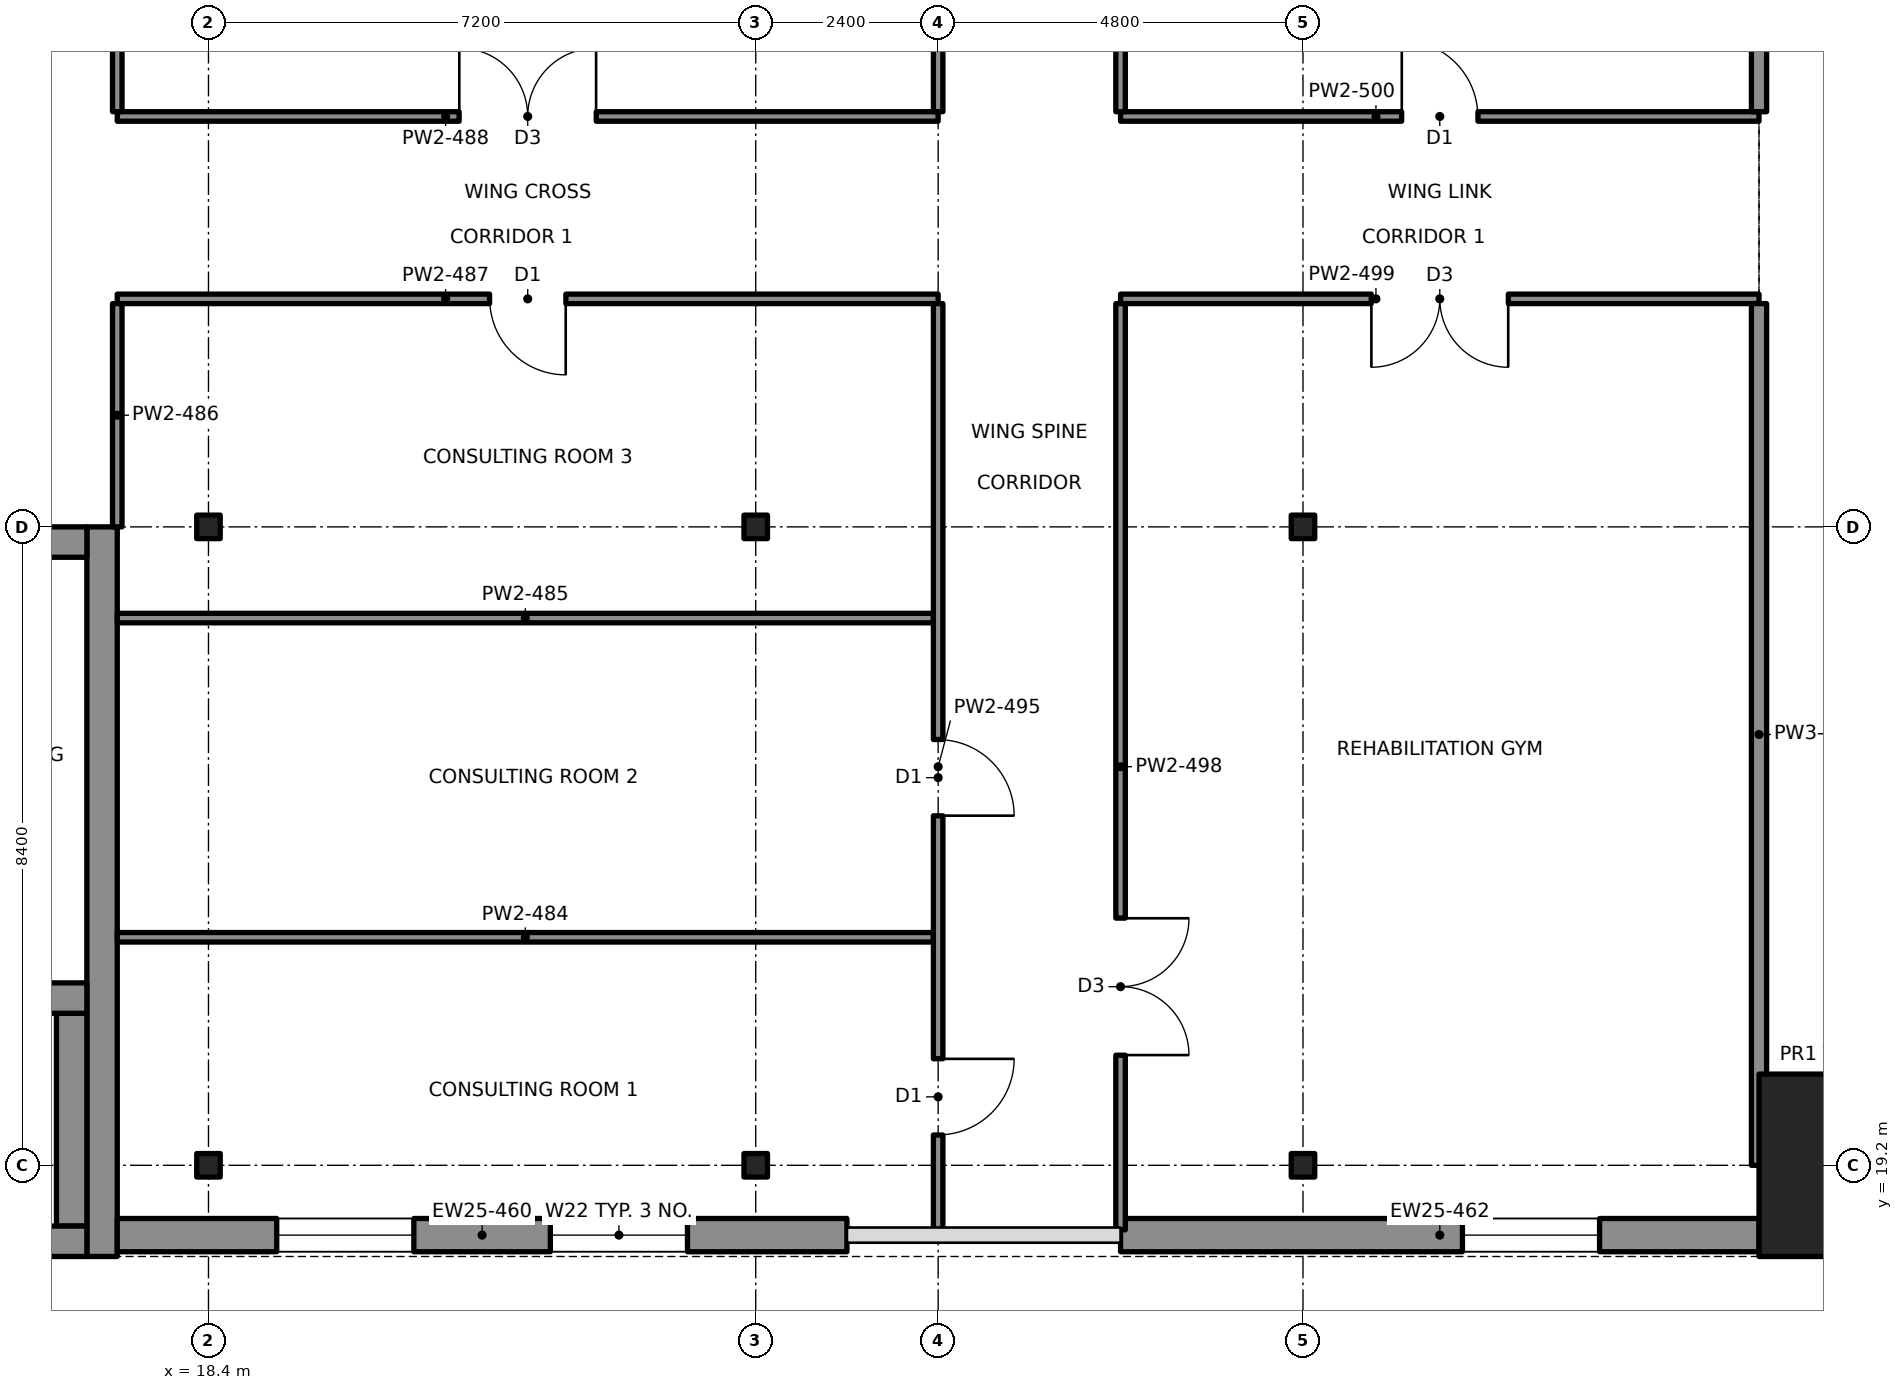
"""IFC4 building model, lengths in metres.
Left out: names, types, materials, properties, quantities, classifications, styles, units other than length and angle.
Written with IfcOpenShell. Run it as: python <this file> out.ifc"""

import sys

from ifc_helpers import new_model, si_unit, direction, frame, frame_2d, origin, origin_2d, place, context, subcontext, project, spatial, rectangle, i_section, extrude, element, fill, save


model = new_model("IFC4")
c1 = context("Model", 3, precision=1e-05, world=origin(), true_north=direction((0.0, 1.0)))
c2 = subcontext(c1, "Body", "Model", "MODEL_VIEW")
j1 = project(units=[si_unit("LENGTHUNIT", "METRE"), si_unit("PLANEANGLEUNIT", "RADIAN")], contexts=[c1])
p1 = place(None, origin())
s1 = spatial("IfcSite", under=j1, at=p1, CompositionType="ELEMENT")
p2 = place(p1, origin())
s2 = spatial("IfcBuilding", under=s1, at=p2, CompositionType="ELEMENT")
p3 = place(p2, frame((0.0, 0.0, 4.4)))
s3 = spatial("IfcBuildingStorey", under=s2, at=p3, CompositionType="ELEMENT", Elevation=4.4)
p4 = place(p3, frame((40.0, 19.2, 0.0), z_axis=(0.0, 0.0, 1.0), x_axis=(1.0, 0.0, 0.0)))
e1 = element("IfcColumn", 1, at=p4, inside=s3, PredefinedType="COLUMN", context=c2, shape_type="SweptSolid", body=[
    extrude(rectangle(XDim=2.4, YDim=2.4, at=origin_2d()), origin(), (0.0, 0.0, 1.0), 4.4),
])
for number, where, z_axis, x_axis in (
    (2, (18.4, 19.2, 0.0), (0.0, 0.0, 1.0), (1.0, 0.0, 0.0)),
    (3, (18.4, 27.6, 0.0), (0.0, 0.0, 1.0), (1.0, 0.0, 0.0)),
    (4, (25.6, 19.2, 0.0), (0.0, 0.0, 1.0), (1.0, 0.0, 0.0)),
    (5, (25.6, 27.6, 0.0), (0.0, 0.0, 1.0), (1.0, 0.0, 0.0)),
    (6, (32.8, 19.2, 0.0), (0.0, 0.0, 1.0), (1.0, 0.0, 0.0)),
    (7, (32.8, 27.6, 0.0), (0.0, 0.0, 1.0), (1.0, 0.0, 0.0)),
):
    element("IfcColumn", number, at=place(p3, frame(where, z_axis=z_axis, x_axis=x_axis)), inside=s3, PredefinedType="COLUMN", context=c2, shape_type="SweptSolid", body=[
        extrude(i_section(OverallWidth=0.309, OverallDepth=0.323, WebThickness=0.014, FlangeThickness=0.023, at=origin_2d()), origin(), (0.0, 0.0, 1.0), 4.4),
    ])
p5 = place(p3, frame((17.2, 18.281, 0.0), z_axis=(0.0, 0.0, 1.0), x_axis=(1.0, 0.0, 0.0)))
e8 = element("IfcWall", 8, at=p5, inside=s3, PredefinedType="SOLIDWALL", context=c2, shape_type="SweptSolid", body=[
    extrude(rectangle(XDim=9.6, YDim=0.438, at=frame_2d((4.8, 0.0))), origin(), (0.0, 0.0, 1.0), 4.4),
])
p6 = place(p5, frame((2.1, 0.0, 0.75)))
e9 = element("IfcOpeningElement", 9, at=p6, cuts=e8, PredefinedType="OPENING", context=c2, shape_type="SweptSolid", body=[
    extrude(rectangle(XDim=1.8, YDim=2.8, at=frame_2d((0.9, 1.4))), frame((0.0, 0.229, 0.0), z_axis=(0.0, -1.0, 0.0), x_axis=(1.0, 0.0, 0.0)), (0.0, 0.0, 1.0), 0.458),
])
p7 = place(p5, frame((5.7, 0.0, 0.75)))
e10 = element("IfcOpeningElement", 10, at=p7, cuts=e8, PredefinedType="OPENING", context=c2, shape_type="SweptSolid", body=[
    extrude(rectangle(XDim=1.8, YDim=2.8, at=frame_2d((0.9, 1.4))), frame((0.0, 0.229, 0.0), z_axis=(0.0, -1.0, 0.0), x_axis=(1.0, 0.0, 0.0)), (0.0, 0.0, 1.0), 0.458),
])
p8 = place(p3, frame((30.4, 18.281, 0.0), z_axis=(0.0, 0.0, 1.0), x_axis=(1.0, 0.0, 0.0)))
e11 = element("IfcWall", 11, at=p8, inside=s3, PredefinedType="SOLIDWALL", context=c2, shape_type="SweptSolid", body=[
    extrude(rectangle(XDim=8.4, YDim=0.438, at=frame_2d((4.2, 0.0))), origin(), (0.0, 0.0, 1.0), 4.4),
])
p9 = place(p8, frame((4.5, 0.0, 0.75)))
e12 = element("IfcOpeningElement", 12, at=p9, cuts=e11, PredefinedType="OPENING", context=c2, shape_type="SweptSolid", body=[
    extrude(rectangle(XDim=1.8, YDim=2.8, at=frame_2d((0.9, 1.4))), frame((0.0, 0.229, 0.0), z_axis=(0.0, -1.0, 0.0), x_axis=(1.0, 0.0, 0.0)), (0.0, 0.0, 1.0), 0.458),
])
p10 = place(p3, frame((17.0, 18.0, 0.0), z_axis=(0.0, 0.0, 1.0), x_axis=(0.0, 1.0, 0.0)))
e13 = element("IfcWall", 13, at=p10, inside=s3, PredefinedType="SHEAR", context=c2, shape_type="SweptSolid", body=[
    extrude(rectangle(XDim=9.6, YDim=0.4, at=frame_2d((4.8, 0.0))), origin(), (0.0, 0.0, 1.0), 4.4),
])
p11 = place(p3, frame((10.4, 18.2, 0.0), z_axis=(0.0, 0.0, 1.0), x_axis=(1.0, 0.0, 0.0)))
e14 = element("IfcWall", 14, at=p11, inside=s3, PredefinedType="SHEAR", context=c2, shape_type="SweptSolid", body=[
    extrude(rectangle(XDim=6.4, YDim=0.4, at=frame_2d((3.2, 0.0))), origin(), (0.0, 0.0, 1.0), 4.4),
])
p12 = place(p3, frame((10.4, 27.4, 0.0), z_axis=(0.0, 0.0, 1.0), x_axis=(1.0, 0.0, 0.0)))
e15 = element("IfcWall", 15, at=p12, inside=s3, PredefinedType="SHEAR", context=c2, shape_type="SweptSolid", body=[
    extrude(rectangle(XDim=6.4, YDim=0.4, at=frame_2d((3.2, 0.0))), origin(), (0.0, 0.0, 1.0), 4.4),
])
p13 = place(p12, frame((4.4, 0.0, 0.0)))
e16 = element("IfcOpeningElement", 16, at=p13, cuts=e15, PredefinedType="OPENING", context=c2, shape_type="SweptSolid", body=[
    extrude(rectangle(XDim=1.2, YDim=2.1, at=frame_2d((0.6, 1.05))), frame((0.0, 0.21, 0.0), z_axis=(0.0, -1.0, 0.0), x_axis=(1.0, 0.0, 0.0)), (0.0, 0.0, 1.0), 0.42),
])
p14 = place(p3, frame((14.0, 21.4, 0.0), z_axis=(0.0, 0.0, 1.0), x_axis=(1.0, 0.0, 0.0)))
e17 = element("IfcWall", 17, at=p14, inside=s3, PredefinedType="SHEAR", context=c2, shape_type="SweptSolid", body=[
    extrude(rectangle(XDim=2.8, YDim=0.4, at=frame_2d((1.4, 0.0))), origin(), (0.0, 0.0, 1.0), 4.4),
])
p15 = place(p14, frame((0.65, 0.0, 0.0)))
e18 = element("IfcOpeningElement", 18, at=p15, cuts=e17, PredefinedType="OPENING", context=c2, shape_type="SweptSolid", body=[
    extrude(rectangle(XDim=1.1, YDim=2.1, at=frame_2d((0.55, 1.05))), frame((0.0, 0.21, 0.0), z_axis=(0.0, -1.0, 0.0), x_axis=(1.0, 0.0, 0.0)), (0.0, 0.0, 1.0), 0.42),
])
p16 = place(p3, frame((16.6, 18.4, 0.0), z_axis=(0.0, 0.0, 1.0), x_axis=(0.0, 1.0, 0.0)))
e19 = element("IfcWall", 19, at=p16, inside=s3, PredefinedType="SHEAR", context=c2, shape_type="SweptSolid", body=[
    extrude(rectangle(XDim=2.8, YDim=0.4, at=frame_2d((1.4, 0.0))), origin(), (0.0, 0.0, 1.0), 4.4),
])
for number, where, z_axis, x_axis in (
    (20, (17.2, 22.2, 0.0), (0.0, 0.0, 1.0), (1.0, 0.0, 0.0)),
    (21, (17.2, 26.4, 0.0), (0.0, 0.0, 1.0), (1.0, 0.0, 0.0)),
):
    element("IfcWall", number, at=place(p3, frame(where, z_axis=z_axis, x_axis=x_axis)), inside=s3, PredefinedType="PARTITIONING", context=c2, shape_type="SweptSolid", body=[
        extrude(rectangle(XDim=10.738, YDim=0.125, at=frame_2d((5.369, 0.0))), origin(), (0.0, 0.0, 1.0), 3.65),
    ])
p17 = place(p3, frame((17.2, 30.6, 0.0), z_axis=(0.0, 0.0, 1.0), x_axis=(1.0, 0.0, 0.0)))
e22 = element("IfcWall", 22, at=p17, inside=s3, PredefinedType="PARTITIONING", context=c2, shape_type="SweptSolid", body=[
    extrude(rectangle(XDim=10.8, YDim=0.125, at=frame_2d((5.4, 0.0))), origin(), (0.0, 0.0, 1.0), 3.65),
])
p18 = place(p17, frame((4.9, 0.0, 0.0)))
e23 = element("IfcOpeningElement", 23, at=p18, cuts=e22, PredefinedType="OPENING", context=c2, shape_type="SweptSolid", body=[
    extrude(rectangle(XDim=1.0, YDim=2.1, at=frame_2d((0.5, 1.05))), frame((0.0, 0.073, 0.0), z_axis=(0.0, -1.0, 0.0), x_axis=(1.0, 0.0, 0.0)), (0.0, 0.0, 1.0), 0.145),
])
p19 = place(p3, frame((30.4, 30.6, 0.0), z_axis=(0.0, 0.0, 1.0), x_axis=(1.0, 0.0, 0.0)))
e24 = element("IfcWall", 24, at=p19, inside=s3, PredefinedType="PARTITIONING", context=c2, shape_type="SweptSolid", body=[
    extrude(rectangle(XDim=8.4, YDim=0.125, at=frame_2d((4.2, 0.0))), origin(), (0.0, 0.0, 1.0), 3.65),
])
p20 = place(p19, frame((3.3, 0.0, 0.0)))
e25 = element("IfcOpeningElement", 25, at=p20, cuts=e24, PredefinedType="OPENING", context=c2, shape_type="SweptSolid", body=[
    extrude(rectangle(XDim=1.8, YDim=2.1, at=frame_2d((0.9, 1.05))), frame((0.0, 0.073, 0.0), z_axis=(0.0, -1.0, 0.0), x_axis=(1.0, 0.0, 0.0)), (0.0, 0.0, 1.0), 0.145),
])
p21 = place(p3, frame((17.2, 33.0, 0.0), z_axis=(0.0, 0.0, 1.0), x_axis=(1.0, 0.0, 0.0)))
e26 = element("IfcWall", 26, at=p21, inside=s3, PredefinedType="PARTITIONING", context=c2, shape_type="SweptSolid", body=[
    extrude(rectangle(XDim=10.8, YDim=0.125, at=frame_2d((5.4, 0.0))), origin(), (0.0, 0.0, 1.0), 3.65),
])
p22 = place(p21, frame((4.5, 0.0, 0.0)))
e27 = element("IfcOpeningElement", 27, at=p22, cuts=e26, PredefinedType="OPENING", context=c2, shape_type="SweptSolid", body=[
    extrude(rectangle(XDim=1.8, YDim=2.1, at=frame_2d((0.9, 1.05))), frame((0.0, 0.073, 0.0), z_axis=(0.0, -1.0, 0.0), x_axis=(1.0, 0.0, 0.0)), (0.0, 0.0, 1.0), 0.145),
])
p23 = place(p3, frame((30.4, 33.0, 0.0), z_axis=(0.0, 0.0, 1.0), x_axis=(1.0, 0.0, 0.0)))
e28 = element("IfcWall", 28, at=p23, inside=s3, PredefinedType="PARTITIONING", context=c2, shape_type="SweptSolid", body=[
    extrude(rectangle(XDim=8.4, YDim=0.125, at=frame_2d((4.2, 0.0))), origin(), (0.0, 0.0, 1.0), 3.65),
])
p24 = place(p23, frame((3.7, 0.0, 0.0)))
e29 = element("IfcOpeningElement", 29, at=p24, cuts=e28, PredefinedType="OPENING", context=c2, shape_type="SweptSolid", body=[
    extrude(rectangle(XDim=1.0, YDim=2.1, at=frame_2d((0.5, 1.05))), frame((0.0, 0.073, 0.0), z_axis=(0.0, -1.0, 0.0), x_axis=(1.0, 0.0, 0.0)), (0.0, 0.0, 1.0), 0.145),
])
p25 = place(p3, frame((17.2, 27.6, 0.0), z_axis=(0.0, 0.0, 1.0), x_axis=(0.0, 1.0, 0.0)))
e30 = element("IfcWall", 30, at=p25, inside=s3, PredefinedType="PARTITIONING", context=c2, shape_type="SweptSolid", body=[
    extrude(rectangle(XDim=2.938, YDim=0.125, at=frame_2d((1.469, 0.0))), origin(), (0.0, 0.0, 1.0), 3.65),
])
p26 = place(p3, frame((17.2, 33.062, 0.0), z_axis=(0.0, 0.0, 1.0), x_axis=(0.0, 1.0, 0.0)))
e31 = element("IfcWall", 31, at=p26, inside=s3, PredefinedType="PARTITIONING", context=c2, shape_type="SweptSolid", body=[
    extrude(rectangle(XDim=5.875, YDim=0.125, at=frame_2d((2.938, 0.0))), origin(), (0.0, 0.0, 1.0), 3.65),
])
p27 = place(p3, frame((28.0, 18.351, 0.0), z_axis=(0.0, 0.0, 1.0), x_axis=(0.0, 1.0, 0.0)))
e32 = element("IfcWall", 32, at=p27, inside=s3, PredefinedType="PARTITIONING", context=c2, shape_type="SweptSolid", body=[
    extrude(rectangle(XDim=12.186, YDim=0.125, at=frame_2d((6.093, 0.0))), origin(), (0.0, 0.0, 1.0), 3.65),
])
p28 = place(p27, frame((1.249, 0.0, 0.0)))
e33 = element("IfcOpeningElement", 33, at=p28, cuts=e32, PredefinedType="OPENING", context=c2, shape_type="SweptSolid", body=[
    extrude(rectangle(XDim=1.0, YDim=2.1, at=frame_2d((0.5, 1.05))), frame((0.0, 0.073, 0.0), z_axis=(0.0, -1.0, 0.0), x_axis=(1.0, 0.0, 0.0)), (0.0, 0.0, 1.0), 0.145),
])
p29 = place(p27, frame((5.449, 0.0, 0.0)))
e34 = element("IfcOpeningElement", 34, at=p29, cuts=e32, PredefinedType="OPENING", context=c2, shape_type="SweptSolid", body=[
    extrude(rectangle(XDim=1.0, YDim=2.1, at=frame_2d((0.5, 1.05))), frame((0.0, 0.073, 0.0), z_axis=(0.0, -1.0, 0.0), x_axis=(1.0, 0.0, 0.0)), (0.0, 0.0, 1.0), 0.145),
])
p30 = place(p3, frame((28.0, 33.062, 0.0), z_axis=(0.0, 0.0, 1.0), x_axis=(0.0, 1.0, 0.0)))
e35 = element("IfcWall", 35, at=p30, inside=s3, PredefinedType="PARTITIONING", context=c2, shape_type="SweptSolid", body=[
    extrude(rectangle(XDim=5.875, YDim=0.125, at=frame_2d((2.938, 0.0))), origin(), (0.0, 0.0, 1.0), 3.65),
])
p31 = place(p3, frame((30.4, 18.351, 0.0), z_axis=(0.0, 0.0, 1.0), x_axis=(0.0, 1.0, 0.0)))
e36 = element("IfcWall", 36, at=p31, inside=s3, PredefinedType="PARTITIONING", context=c2, shape_type="SweptSolid", body=[
    extrude(rectangle(XDim=12.186, YDim=0.125, at=frame_2d((6.093, 0.0))), origin(), (0.0, 0.0, 1.0), 3.65),
])
p32 = place(p31, frame((2.299, 0.0, 0.0)))
e37 = element("IfcOpeningElement", 37, at=p32, cuts=e36, PredefinedType="OPENING", context=c2, shape_type="SweptSolid", body=[
    extrude(rectangle(XDim=1.8, YDim=2.1, at=frame_2d((0.9, 1.05))), frame((0.0, 0.073, 0.0), z_axis=(0.0, -1.0, 0.0), x_axis=(1.0, 0.0, 0.0)), (0.0, 0.0, 1.0), 0.145),
])
p33 = place(p3, frame((30.4, 33.062, 0.0), z_axis=(0.0, 0.0, 1.0), x_axis=(0.0, 1.0, 0.0)))
e38 = element("IfcWall", 38, at=p33, inside=s3, PredefinedType="PARTITIONING", context=c2, shape_type="SweptSolid", body=[
    extrude(rectangle(XDim=3.238, YDim=0.125, at=frame_2d((1.619, 0.0))), origin(), (0.0, 0.0, 1.0), 3.65),
])
p34 = place(p3, frame((38.8, 19.2, 0.0), z_axis=(0.0, 0.0, 1.0), x_axis=(0.0, 1.0, 0.0)))
e39 = element("IfcWall", 39, at=p34, inside=s3, PredefinedType="PARTITIONING", context=c2, shape_type="SweptSolid", body=[
    extrude(rectangle(XDim=11.338, YDim=0.2, at=frame_2d((5.669, 0.0))), origin(), (0.0, 0.0, 1.0), 3.65),
])
p35 = place(p3, frame((38.8, 33.062, 0.0), z_axis=(0.0, 0.0, 1.0), x_axis=(0.0, 1.0, 0.0)))
e40 = element("IfcWall", 40, at=p35, inside=s3, PredefinedType="PARTITIONING", context=c2, shape_type="SweptSolid", body=[
    extrude(rectangle(XDim=5.837, YDim=0.2, at=frame_2d((2.919, 0.0))), origin(), (0.0, 0.0, 1.0), 3.65),
])
p36 = place(p6, origin())
e41 = element("IfcWindow", 41, at=p36, inside=s3, PartitioningType="SINGLE_PANEL", PredefinedType="WINDOW", context=c2, shape_type="SweptSolid", body=[
    extrude(rectangle(XDim=1.8, YDim=2.8, at=frame_2d((0.9, 1.4))), frame((0.0, 0.03, 0.0), z_axis=(0.0, -1.0, 0.0), x_axis=(1.0, 0.0, 0.0)), (0.0, 0.0, 1.0), 0.06),
])
fill(e9, e41)
p37 = place(p7, origin())
e42 = element("IfcWindow", 42, at=p37, inside=s3, PartitioningType="SINGLE_PANEL", PredefinedType="WINDOW", context=c2, shape_type="SweptSolid", body=[
    extrude(rectangle(XDim=1.8, YDim=2.8, at=frame_2d((0.9, 1.4))), frame((0.0, 0.03, 0.0), z_axis=(0.0, -1.0, 0.0), x_axis=(1.0, 0.0, 0.0)), (0.0, 0.0, 1.0), 0.06),
])
fill(e10, e42)
p38 = place(p9, origin())
e43 = element("IfcWindow", 43, at=p38, inside=s3, PartitioningType="SINGLE_PANEL", PredefinedType="WINDOW", context=c2, shape_type="SweptSolid", body=[
    extrude(rectangle(XDim=1.8, YDim=2.8, at=frame_2d((0.9, 1.4))), frame((0.0, 0.03, 0.0), z_axis=(0.0, -1.0, 0.0), x_axis=(1.0, 0.0, 0.0)), (0.0, 0.0, 1.0), 0.06),
])
fill(e12, e43)
p39 = place(p28, origin())
e44 = element("IfcDoor", 44, at=p39, inside=s3, OperationType="SINGLE_SWING_RIGHT", PredefinedType="DOOR", context=c2, shape_type="SweptSolid", body=[
    extrude(rectangle(XDim=1.0, YDim=2.1, at=frame_2d((0.5, 1.05))), frame((0.0, 0.025, 0.0), z_axis=(0.0, -1.0, 0.0), x_axis=(1.0, 0.0, 0.0)), (0.0, 0.0, 1.0), 0.05),
])
fill(e33, e44)
p40 = place(p29, origin())
e45 = element("IfcDoor", 45, at=p40, inside=s3, OperationType="SINGLE_SWING_LEFT", PredefinedType="DOOR", context=c2, shape_type="SweptSolid", body=[
    extrude(rectangle(XDim=1.0, YDim=2.1, at=frame_2d((0.5, 1.05))), frame((0.0, 0.025, 0.0), z_axis=(0.0, -1.0, 0.0), x_axis=(1.0, 0.0, 0.0)), (0.0, 0.0, 1.0), 0.05),
])
fill(e34, e45)
p41 = place(p18, origin())
e46 = element("IfcDoor", 46, at=p41, inside=s3, OperationType="SINGLE_SWING_RIGHT", PredefinedType="DOOR", context=c2, shape_type="SweptSolid", body=[
    extrude(rectangle(XDim=1.0, YDim=2.1, at=frame_2d((0.5, 1.05))), frame((0.0, 0.025, 0.0), z_axis=(0.0, -1.0, 0.0), x_axis=(1.0, 0.0, 0.0)), (0.0, 0.0, 1.0), 0.05),
])
fill(e23, e46)
p42 = place(p22, origin())
e47 = element("IfcDoor", 47, at=p42, inside=s3, OperationType="DOUBLE_DOOR_SINGLE_SWING", PredefinedType="DOOR", context=c2, shape_type="SweptSolid", body=[
    extrude(rectangle(XDim=1.8, YDim=2.1, at=frame_2d((0.9, 1.05))), frame((0.0, 0.025, 0.0), z_axis=(0.0, -1.0, 0.0), x_axis=(1.0, 0.0, 0.0)), (0.0, 0.0, 1.0), 0.05),
])
fill(e27, e47)
p43 = place(p32, origin())
e48 = element("IfcDoor", 48, at=p43, inside=s3, OperationType="DOUBLE_DOOR_SINGLE_SWING", PredefinedType="DOOR", context=c2, shape_type="SweptSolid", body=[
    extrude(rectangle(XDim=1.8, YDim=2.1, at=frame_2d((0.9, 1.05))), frame((0.0, 0.025, 0.0), z_axis=(0.0, -1.0, 0.0), x_axis=(1.0, 0.0, 0.0)), (0.0, 0.0, 1.0), 0.05),
])
fill(e37, e48)
p44 = place(p24, origin())
e49 = element("IfcDoor", 49, at=p44, inside=s3, OperationType="SINGLE_SWING_LEFT", PredefinedType="DOOR", context=c2, shape_type="SweptSolid", body=[
    extrude(rectangle(XDim=1.0, YDim=2.1, at=frame_2d((0.5, 1.05))), frame((0.0, 0.025, 0.0), z_axis=(0.0, -1.0, 0.0), x_axis=(1.0, 0.0, 0.0)), (0.0, 0.0, 1.0), 0.05),
])
fill(e29, e49)
p45 = place(p20, origin())
e50 = element("IfcDoor", 50, at=p45, inside=s3, OperationType="DOUBLE_DOOR_SINGLE_SWING", PredefinedType="DOOR", context=c2, shape_type="SweptSolid", body=[
    extrude(rectangle(XDim=1.8, YDim=2.1, at=frame_2d((0.9, 1.05))), frame((0.0, 0.025, 0.0), z_axis=(0.0, -1.0, 0.0), x_axis=(1.0, 0.0, 0.0)), (0.0, 0.0, 1.0), 0.05),
])
fill(e25, e50)
save(model, sys.argv[1])
